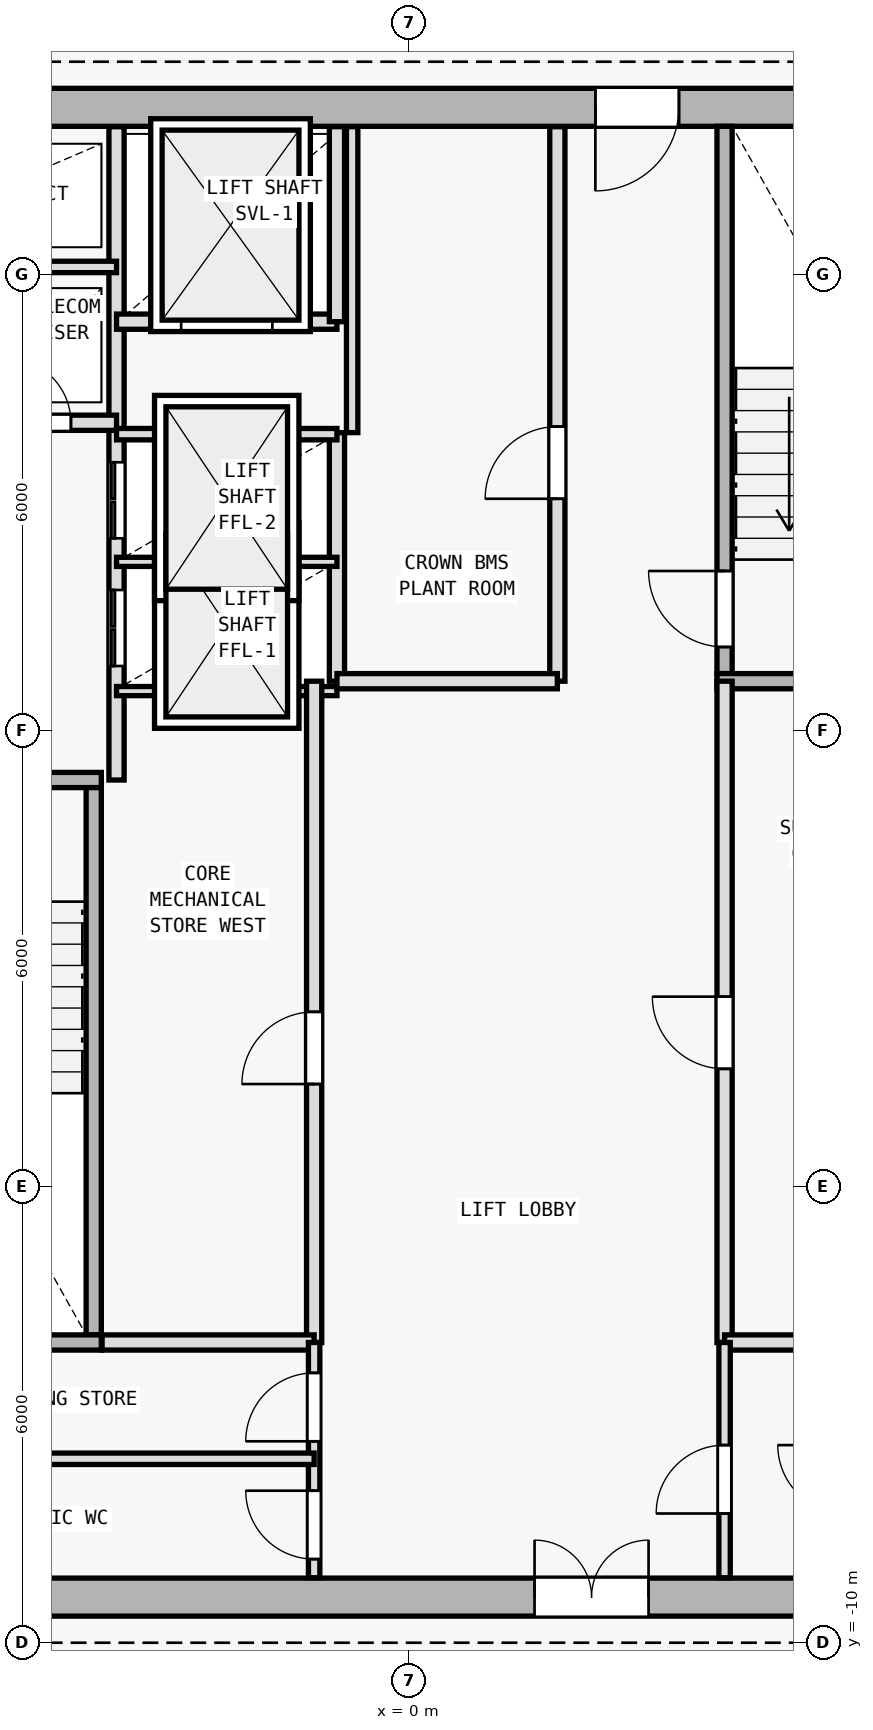
"""IFC4 building model, lengths in metres.
Left out: names, types, materials, properties, quantities, classifications, styles, units other than length and angle.
Written with IfcOpenShell. Run it as: python <this file> out.ifc"""

import sys

from ifc_helpers import new_model, si_unit, direction, frame, frame_2d, origin, origin_2d, place, context, subcontext, project, spatial, rectangle, i_section, extrude, element, fill, save


model = new_model("IFC4")
c1 = context("Model", 3, precision=1e-05, world=origin(), true_north=direction((0.0, 1.0)))
c2 = subcontext(c1, "Body", "Model", "MODEL_VIEW")
j1 = project(units=[si_unit("LENGTHUNIT", "METRE"), si_unit("PLANEANGLEUNIT", "RADIAN")], contexts=[c1])
p1 = place(None, origin())
s1 = spatial("IfcSite", under=j1, at=p1, CompositionType="ELEMENT")
p2 = place(p1, origin())
s2 = spatial("IfcBuilding", under=s1, at=p2, CompositionType="ELEMENT")
p3 = place(p2, frame((0.0, 0.0, 304.8)))
s3 = spatial("IfcBuildingStorey", under=s2, at=p3, CompositionType="ELEMENT", Elevation=304.8)
p4 = place(p3, frame((0.0, -9.4, 0.0), z_axis=(0.0, 0.0, 1.0), x_axis=(1.0, 0.0, 0.0)))
e1 = element("IfcColumn", 1, at=p4, inside=s3, PredefinedType="COLUMN", context=c2, shape_type="SweptSolid", body=[
    extrude(i_section(OverallWidth=0.374, OverallDepth=0.372, WebThickness=0.012, FlangeThickness=0.02, FilletRadius=0.015, at=origin_2d()), origin(), (0.0, 0.0, 1.0), 3.6),
])
p5 = place(p3, frame((-7.95, -9.4, 0.0), z_axis=(0.0, 0.0, 1.0), x_axis=(1.0, 0.0, 0.0)))
e2 = element("IfcWall", 2, at=p5, inside=s3, PredefinedType="SHEAR", context=c2, shape_type="SweptSolid", body=[
    extrude(rectangle(XDim=15.9, YDim=0.5, at=frame_2d((7.95, 0.0))), origin(), (0.0, 0.0, 1.0), 3.34),
])
p6 = place(p5, frame((9.6, 0.0, 0.0)))
e3 = element("IfcOpeningElement", 3, at=p6, cuts=e2, PredefinedType="OPENING", context=c2, shape_type="SweptSolid", body=[
    extrude(rectangle(XDim=1.5, YDim=2.2, at=frame_2d((0.75, 1.1))), frame((0.0, 0.26, 0.0), z_axis=(0.0, -1.0, 0.0), x_axis=(1.0, 0.0, 0.0)), (0.0, 0.0, 1.0), 0.52),
])
p7 = place(p3, frame((7.95, 10.2, 0.0), z_axis=(0.0, 0.0, 1.0), x_axis=(-1.0, 0.0, 0.0)))
e4 = element("IfcWall", 4, at=p7, inside=s3, PredefinedType="SHEAR", context=c2, shape_type="SweptSolid", body=[
    extrude(rectangle(XDim=15.9, YDim=0.5, at=frame_2d((7.95, 0.0))), origin(), (0.0, 0.0, 1.0), 3.34),
])
p8 = place(p7, frame((4.4, 0.0, 0.0)))
e5 = element("IfcOpeningElement", 5, at=p8, cuts=e4, PredefinedType="OPENING", context=c2, shape_type="SweptSolid", body=[
    extrude(rectangle(XDim=1.1, YDim=2.15, at=frame_2d((0.55, 1.075))), frame((0.0, 0.26, 0.0), z_axis=(0.0, -1.0, 0.0), x_axis=(1.0, 0.0, 0.0)), (0.0, 0.0, 1.0), 0.52),
])
p9 = place(p3, frame((-7.45, 1.35, 0.0), z_axis=(0.0, 0.0, 1.0), x_axis=(1.0, 0.0, 0.0)))
e6 = element("IfcWall", 6, at=p9, inside=s3, PredefinedType="SOLIDWALL", context=c2, shape_type="SweptSolid", body=[
    extrude(rectangle(XDim=3.4, YDim=0.2, at=frame_2d((1.7, 0.0))), origin(), (0.0, 0.0, 1.0), 3.34),
])
p10 = place(p9, frame((0.65, 0.0, 0.0)))
e7 = element("IfcOpeningElement", 7, at=p10, cuts=e6, PredefinedType="OPENING", context=c2, shape_type="SweptSolid", body=[
    extrude(rectangle(XDim=1.0, YDim=2.15, at=frame_2d((0.5, 1.075))), frame((0.0, 0.11, 0.0), z_axis=(0.0, -1.0, 0.0), x_axis=(1.0, 0.0, 0.0)), (0.0, 0.0, 1.0), 0.22),
])
p11 = place(p3, frame((-4.15, -5.95, 0.0), z_axis=(0.0, 0.0, 1.0), x_axis=(0.0, 1.0, 0.0)))
e8 = element("IfcWall", 8, at=p11, inside=s3, PredefinedType="SOLIDWALL", context=c2, shape_type="SweptSolid", body=[
    extrude(rectangle(XDim=7.2, YDim=0.2, at=frame_2d((3.6, 0.0))), origin(), (0.0, 0.0, 1.0), 3.34),
])
p12 = place(p3, frame((-3.85, 1.35, 0.0), z_axis=(0.0, 0.0, 1.0), x_axis=(0.0, 1.0, 0.0)))
e9 = element("IfcWall", 9, at=p12, inside=s3, PredefinedType="SOLIDWALL", context=c2, shape_type="SweptSolid", body=[
    extrude(rectangle(XDim=8.595, YDim=0.2, at=frame_2d((4.297, 0.0))), origin(), (0.0, 0.0, 1.0), 3.34),
])
p13 = place(p12, frame((1.5, 0.0, 0.0)))
e10 = element("IfcOpeningElement", 10, at=p13, cuts=e9, PredefinedType="OPENING", context=c2, shape_type="SweptSolid", body=[
    extrude(rectangle(XDim=1.0, YDim=2.15, at=frame_2d((0.5, 1.075))), frame((0.0, 0.11, 0.0), z_axis=(0.0, -1.0, 0.0), x_axis=(1.0, 0.0, 0.0)), (0.0, 0.0, 1.0), 0.22),
])
p14 = place(p12, frame((3.18, 0.0, 0.0)))
e11 = element("IfcOpeningElement", 11, at=p14, cuts=e9, PredefinedType="OPENING", context=c2, shape_type="SweptSolid", body=[
    extrude(rectangle(XDim=1.0, YDim=2.15, at=frame_2d((0.5, 1.075))), frame((0.0, 0.11, 0.0), z_axis=(0.0, -1.0, 0.0), x_axis=(1.0, 0.0, 0.0)), (0.0, 0.0, 1.0), 0.22),
])
p15 = place(p3, frame((-7.445, 6.05, 0.0), z_axis=(0.0, 0.0, 1.0), x_axis=(1.0, 0.0, 0.0)))
e12 = element("IfcWall", 12, at=p15, inside=s3, PredefinedType="SOLIDWALL", context=c2, shape_type="SweptSolid", body=[
    extrude(rectangle(XDim=3.595, YDim=0.2, at=frame_2d((1.797, 0.0))), origin(), (0.0, 0.0, 1.0), 3.34),
])
p16 = place(p15, frame((0.345, 0.0, 0.0)))
e13 = element("IfcOpeningElement", 13, at=p16, cuts=e12, PredefinedType="OPENING", context=c2, shape_type="SweptSolid", body=[
    extrude(rectangle(XDim=0.85, YDim=2.1, at=frame_2d((0.425, 1.05))), frame((0.0, 0.11, 0.0), z_axis=(0.0, -1.0, 0.0), x_axis=(1.0, 0.0, 0.0)), (0.0, 0.0, 1.0), 0.22),
])
p17 = place(p15, frame((2.145, 0.0, 0.0)))
e14 = element("IfcOpeningElement", 14, at=p17, cuts=e12, PredefinedType="OPENING", context=c2, shape_type="SweptSolid", body=[
    extrude(rectangle(XDim=0.85, YDim=2.1, at=frame_2d((0.425, 1.05))), frame((0.0, 0.11, 0.0), z_axis=(0.0, -1.0, 0.0), x_axis=(1.0, 0.0, 0.0)), (0.0, 0.0, 1.0), 0.22),
])
p18 = place(p3, frame((-7.445, 8.1, 0.0), z_axis=(0.0, 0.0, 1.0), x_axis=(1.0, 0.0, 0.0)))
e15 = element("IfcWall", 15, at=p18, inside=s3, PredefinedType="PARTITIONING", context=c2, shape_type="SweptSolid", body=[
    extrude(rectangle(XDim=3.595, YDim=0.15, at=frame_2d((1.797, 0.0))), origin(), (0.0, 0.0, 1.0), 3.34),
])
p19 = place(p3, frame((4.15, 2.75, 0.0), z_axis=(0.0, 0.0, 1.0), x_axis=(0.0, 1.0, 0.0)))
e16 = element("IfcWall", 16, at=p19, inside=s3, PredefinedType="SOLIDWALL", context=c2, shape_type="SweptSolid", body=[
    extrude(rectangle(XDim=7.2, YDim=0.2, at=frame_2d((3.6, 0.0))), origin(), (0.0, 0.0, 1.0), 3.34),
])
p20 = place(p19, frame((0.35, 0.0, 0.0)))
e17 = element("IfcOpeningElement", 17, at=p20, cuts=e16, PredefinedType="OPENING", context=c2, shape_type="SweptSolid", body=[
    extrude(rectangle(XDim=1.0, YDim=2.15, at=frame_2d((0.5, 1.075))), frame((0.0, 0.11, 0.0), z_axis=(0.0, -1.0, 0.0), x_axis=(1.0, 0.0, 0.0)), (0.0, 0.0, 1.0), 0.22),
])
p21 = place(p3, frame((4.05, 2.65, 0.0), z_axis=(0.0, 0.0, 1.0), x_axis=(1.0, 0.0, 0.0)))
e18 = element("IfcWall", 18, at=p21, inside=s3, PredefinedType="SOLIDWALL", context=c2, shape_type="SweptSolid", body=[
    extrude(rectangle(XDim=3.4, YDim=0.2, at=frame_2d((1.7, 0.0))), origin(), (0.0, 0.0, 1.0), 3.34),
])
p22 = place(p3, frame((-0.95, 2.65, 0.0), z_axis=(0.0, 0.0, 1.0), x_axis=(0.0, 1.0, 0.0)))
e19 = element("IfcWall", 19, at=p22, inside=s3, PredefinedType="SOLIDWALL", context=c2, shape_type="SweptSolid", body=[
    extrude(rectangle(XDim=3.27, YDim=0.2, at=frame_2d((1.635, 0.0))), origin(), (0.0, 0.0, 1.0), 3.34),
])
for number, where, z_axis, x_axis in (
    (20, (-3.85, 2.52, 0.0), (0.0, 0.0, 1.0), (1.0, 0.0, 0.0)),
    (21, (-3.85, 4.22, 0.0), (0.0, 0.0, 1.0), (1.0, 0.0, 0.0)),
):
    element("IfcWall", number, at=place(p3, frame(where, z_axis=z_axis, x_axis=x_axis)), inside=s3, PredefinedType="PARTITIONING", context=c2, shape_type="SweptSolid", body=[
        extrude(rectangle(XDim=2.9, YDim=0.12, at=frame_2d((1.45, 0.0))), origin(), (0.0, 0.0, 1.0), 3.34),
    ])
p23 = place(p3, frame((-3.85, 5.9, 0.0), z_axis=(0.0, 0.0, 1.0), x_axis=(1.0, 0.0, 0.0)))
e22 = element("IfcWall", 22, at=p23, inside=s3, PredefinedType="PARTITIONING", context=c2, shape_type="SweptSolid", body=[
    extrude(rectangle(XDim=2.9, YDim=0.15, at=frame_2d((1.45, 0.0))), origin(), (0.0, 0.0, 1.0), 3.34),
])
p24 = place(p3, frame((-3.85, 7.38, 0.0), z_axis=(0.0, 0.0, 1.0), x_axis=(1.0, 0.0, 0.0)))
e23 = element("IfcWall", 23, at=p24, inside=s3, PredefinedType="SOLIDWALL", context=c2, shape_type="SweptSolid", body=[
    extrude(rectangle(XDim=2.9, YDim=0.2, at=frame_2d((1.45, 0.0))), origin(), (0.0, 0.0, 1.0), 3.34),
])
p25 = place(p24, frame((0.85, 0.0, 0.0)))
e24 = element("IfcOpeningElement", 24, at=p25, cuts=e23, PredefinedType="OPENING", context=c2, shape_type="SweptSolid", body=[
    extrude(rectangle(XDim=1.2, YDim=2.2, at=frame_2d((0.6, 1.1))), frame((0.0, 0.11, 0.0), z_axis=(0.0, -1.0, 0.0), x_axis=(1.0, 0.0, 0.0)), (0.0, 0.0, 1.0), 0.22),
])
p26 = place(p3, frame((-0.95, 7.38, 0.0), z_axis=(0.0, 0.0, 1.0), x_axis=(0.0, 1.0, 0.0)))
e25 = element("IfcWall", 25, at=p26, inside=s3, PredefinedType="SOLIDWALL", context=c2, shape_type="SweptSolid", body=[
    extrude(rectangle(XDim=2.565, YDim=0.2, at=frame_2d((1.283, 0.0))), origin(), (0.0, 0.0, 1.0), 3.34),
])
p27 = place(p3, frame((4.15, -6.05, 0.0), z_axis=(0.0, 0.0, 1.0), x_axis=(0.0, 1.0, 0.0)))
e26 = element("IfcWall", 26, at=p27, inside=s3, PredefinedType="SOLIDWALL", context=c2, shape_type="SweptSolid", body=[
    extrude(rectangle(XDim=8.7, YDim=0.2, at=frame_2d((4.35, 0.0))), origin(), (0.0, 0.0, 1.0), 3.34),
])
p28 = place(p27, frame((3.6, 0.0, 0.0)))
e27 = element("IfcOpeningElement", 27, at=p28, cuts=e26, PredefinedType="OPENING", context=c2, shape_type="SweptSolid", body=[
    extrude(rectangle(XDim=0.95, YDim=2.1, at=frame_2d((0.475, 1.05))), frame((0.0, 0.11, 0.0), z_axis=(0.0, -1.0, 0.0), x_axis=(1.0, 0.0, 0.0)), (0.0, 0.0, 1.0), 0.22),
])
p29 = place(p3, frame((-1.25, -6.05, 0.0), z_axis=(0.0, 0.0, 1.0), x_axis=(0.0, 1.0, 0.0)))
e28 = element("IfcWall", 28, at=p29, inside=s3, PredefinedType="SOLIDWALL", context=c2, shape_type="SweptSolid", body=[
    extrude(rectangle(XDim=8.7, YDim=0.2, at=frame_2d((4.35, 0.0))), origin(), (0.0, 0.0, 1.0), 3.34),
])
p30 = place(p29, frame((3.4, 0.0, 0.0)))
e29 = element("IfcOpeningElement", 29, at=p30, cuts=e28, PredefinedType="OPENING", context=c2, shape_type="SweptSolid", body=[
    extrude(rectangle(XDim=0.95, YDim=2.1, at=frame_2d((0.475, 1.05))), frame((0.0, 0.11, 0.0), z_axis=(0.0, -1.0, 0.0), x_axis=(1.0, 0.0, 0.0)), (0.0, 0.0, 1.0), 0.22),
])
p31 = place(p3, frame((1.95, 2.65, 0.0), z_axis=(0.0, 0.0, 1.0), x_axis=(0.0, 1.0, 0.0)))
e30 = element("IfcWall", 30, at=p31, inside=s3, PredefinedType="SOLIDWALL", context=c2, shape_type="SweptSolid", body=[
    extrude(rectangle(XDim=7.295, YDim=0.2, at=frame_2d((3.647, 0.0))), origin(), (0.0, 0.0, 1.0), 3.34),
])
p32 = place(p31, frame((2.4, 0.0, 0.0)))
e31 = element("IfcOpeningElement", 31, at=p32, cuts=e30, PredefinedType="OPENING", context=c2, shape_type="SweptSolid", body=[
    extrude(rectangle(XDim=0.95, YDim=2.1, at=frame_2d((0.475, 1.05))), frame((0.0, 0.11, 0.0), z_axis=(0.0, -1.0, 0.0), x_axis=(1.0, 0.0, 0.0)), (0.0, 0.0, 1.0), 0.22),
])
p33 = place(p3, frame((-0.95, 2.65, 0.0), z_axis=(0.0, 0.0, 1.0), x_axis=(1.0, 0.0, 0.0)))
e32 = element("IfcWall", 32, at=p33, inside=s3, PredefinedType="SOLIDWALL", context=c2, shape_type="SweptSolid", body=[
    extrude(rectangle(XDim=2.9, YDim=0.2, at=frame_2d((1.45, 0.0))), origin(), (0.0, 0.0, 1.0), 3.34),
])
p34 = place(p3, frame((-0.75, 5.92, 0.0), z_axis=(0.0, 0.0, 1.0), x_axis=(0.0, 1.0, 0.0)))
e33 = element("IfcWall", 33, at=p34, inside=s3, PredefinedType="PARTITIONING", context=c2, shape_type="SweptSolid", body=[
    extrude(rectangle(XDim=4.025, YDim=0.15, at=frame_2d((2.013, 0.0))), origin(), (0.0, 0.0, 1.0), 3.34),
])
p35 = place(p3, frame((-7.45, -6.05, 0.0), z_axis=(0.0, 0.0, 1.0), x_axis=(1.0, 0.0, 0.0)))
e34 = element("IfcWall", 34, at=p35, inside=s3, PredefinedType="SOLIDWALL", context=c2, shape_type="SweptSolid", body=[
    extrude(rectangle(XDim=3.4, YDim=0.2, at=frame_2d((1.7, 0.0))), origin(), (0.0, 0.0, 1.0), 3.34),
])
p36 = place(p3, frame((-4.04, -6.05, 0.0), z_axis=(0.0, 0.0, 1.0), x_axis=(1.0, 0.0, 0.0)))
e35 = element("IfcWall", 35, at=p36, inside=s3, PredefinedType="SOLIDWALL", context=c2, shape_type="SweptSolid", body=[
    extrude(rectangle(XDim=2.79, YDim=0.2, at=frame_2d((1.395, 0.0))), origin(), (0.0, 0.0, 1.0), 3.34),
])
p37 = place(p3, frame((4.15, -6.05, 0.0), z_axis=(0.0, 0.0, 1.0), x_axis=(1.0, 0.0, 0.0)))
e36 = element("IfcWall", 36, at=p37, inside=s3, PredefinedType="SOLIDWALL", context=c2, shape_type="SweptSolid", body=[
    extrude(rectangle(XDim=3.295, YDim=0.2, at=frame_2d((1.647, 0.0))), origin(), (0.0, 0.0, 1.0), 3.34),
])
p38 = place(p3, frame((-1.25, -9.145, 0.0), z_axis=(0.0, 0.0, 1.0), x_axis=(0.0, 1.0, 0.0)))
e37 = element("IfcWall", 37, at=p38, inside=s3, PredefinedType="PARTITIONING", context=c2, shape_type="SweptSolid", body=[
    extrude(rectangle(XDim=3.095, YDim=0.15, at=frame_2d((1.547, 0.0))), origin(), (0.0, 0.0, 1.0), 3.34),
])
p39 = place(p38, frame((1.795, 0.0, 0.0)))
e38 = element("IfcOpeningElement", 38, at=p39, cuts=e37, PredefinedType="OPENING", context=c2, shape_type="SweptSolid", body=[
    extrude(rectangle(XDim=0.9, YDim=2.1, at=frame_2d((0.45, 1.05))), frame((0.0, 0.085, 0.0), z_axis=(0.0, -1.0, 0.0), x_axis=(1.0, 0.0, 0.0)), (0.0, 0.0, 1.0), 0.17),
])
p40 = place(p38, frame((0.245, 0.0, 0.0)))
e39 = element("IfcOpeningElement", 39, at=p40, cuts=e37, PredefinedType="OPENING", context=c2, shape_type="SweptSolid", body=[
    extrude(rectangle(XDim=0.9, YDim=2.1, at=frame_2d((0.45, 1.05))), frame((0.0, 0.085, 0.0), z_axis=(0.0, -1.0, 0.0), x_axis=(1.0, 0.0, 0.0)), (0.0, 0.0, 1.0), 0.17),
])
p41 = place(p3, frame((4.15, -9.145, 0.0), z_axis=(0.0, 0.0, 1.0), x_axis=(0.0, 1.0, 0.0)))
e40 = element("IfcWall", 40, at=p41, inside=s3, PredefinedType="PARTITIONING", context=c2, shape_type="SweptSolid", body=[
    extrude(rectangle(XDim=3.095, YDim=0.15, at=frame_2d((1.547, 0.0))), origin(), (0.0, 0.0, 1.0), 3.34),
])
p42 = place(p41, frame((0.845, 0.0, 0.0)))
e41 = element("IfcOpeningElement", 41, at=p42, cuts=e40, PredefinedType="OPENING", context=c2, shape_type="SweptSolid", body=[
    extrude(rectangle(XDim=0.9, YDim=2.1, at=frame_2d((0.45, 1.05))), frame((0.0, 0.085, 0.0), z_axis=(0.0, -1.0, 0.0), x_axis=(1.0, 0.0, 0.0)), (0.0, 0.0, 1.0), 0.17),
])
p43 = place(p3, frame((-7.445, -7.58, 0.0), z_axis=(0.0, 0.0, 1.0), x_axis=(1.0, 0.0, 0.0)))
e42 = element("IfcWall", 42, at=p43, inside=s3, PredefinedType="PARTITIONING", context=c2, shape_type="SweptSolid", body=[
    extrude(rectangle(XDim=6.195, YDim=0.15, at=frame_2d((3.098, 0.0))), origin(), (0.0, 0.0, 1.0), 3.34),
])
p44 = place(p6, origin())
e43 = element("IfcDoor", 43, at=p44, inside=s3, OperationType="DOUBLE_DOOR_SINGLE_SWING", PredefinedType="DOOR", context=c2, shape_type="SweptSolid", body=[
    extrude(rectangle(XDim=1.5, YDim=2.2, at=frame_2d((0.75, 1.1))), frame((0.0, 0.025, 0.0), z_axis=(0.0, -1.0, 0.0), x_axis=(1.0, 0.0, 0.0)), (0.0, 0.0, 1.0), 0.05),
])
fill(e3, e43)
p45 = place(p8, origin())
e44 = element("IfcDoor", 44, at=p45, inside=s3, OperationType="SINGLE_SWING_RIGHT", PredefinedType="DOOR", context=c2, shape_type="SweptSolid", body=[
    extrude(rectangle(XDim=1.1, YDim=2.15, at=frame_2d((0.55, 1.075))), frame((0.0, 0.025, 0.0), z_axis=(0.0, -1.0, 0.0), x_axis=(1.0, 0.0, 0.0)), (0.0, 0.0, 1.0), 0.05),
])
fill(e5, e44)
p46 = place(p17, origin())
e45 = element("IfcDoor", 45, at=p46, inside=s3, OperationType="SINGLE_SWING_LEFT", PredefinedType="DOOR", context=c2, shape_type="SweptSolid", body=[
    extrude(rectangle(XDim=0.85, YDim=2.1, at=frame_2d((0.425, 1.05))), frame((0.0, 0.025, 0.0), z_axis=(0.0, -1.0, 0.0), x_axis=(1.0, 0.0, 0.0)), (0.0, 0.0, 1.0), 0.05),
])
fill(e14, e45)
p47 = place(p20, origin())
e46 = element("IfcDoor", 46, at=p47, inside=s3, OperationType="SINGLE_SWING_RIGHT", PredefinedType="DOOR", context=c2, shape_type="SweptSolid", body=[
    extrude(rectangle(XDim=1.0, YDim=2.15, at=frame_2d((0.5, 1.075))), frame((0.0, 0.025, 0.0), z_axis=(0.0, -1.0, 0.0), x_axis=(1.0, 0.0, 0.0)), (0.0, 0.0, 1.0), 0.05),
])
fill(e17, e46)
p48 = place(p25, origin())
e47 = element("IfcDoor", 47, at=p48, inside=s3, OperationType="DOUBLE_DOOR_SLIDING", PredefinedType="DOOR", context=c2, shape_type="SweptSolid", body=[
    extrude(rectangle(XDim=1.2, YDim=2.2, at=frame_2d((0.6, 1.1))), frame((0.0, 0.025, 0.0), z_axis=(0.0, -1.0, 0.0), x_axis=(1.0, 0.0, 0.0)), (0.0, 0.0, 1.0), 0.05),
])
fill(e24, e47)
p49 = place(p28, origin())
e48 = element("IfcDoor", 48, at=p49, inside=s3, OperationType="SINGLE_SWING_RIGHT", PredefinedType="DOOR", context=c2, shape_type="SweptSolid", body=[
    extrude(rectangle(XDim=0.95, YDim=2.1, at=frame_2d((0.475, 1.05))), frame((0.0, 0.025, 0.0), z_axis=(0.0, -1.0, 0.0), x_axis=(1.0, 0.0, 0.0)), (0.0, 0.0, 1.0), 0.05),
])
fill(e27, e48)
p50 = place(p30, origin())
e49 = element("IfcDoor", 49, at=p50, inside=s3, OperationType="SINGLE_SWING_LEFT", PredefinedType="DOOR", context=c2, shape_type="SweptSolid", body=[
    extrude(rectangle(XDim=0.95, YDim=2.1, at=frame_2d((0.475, 1.05))), frame((0.0, 0.025, 0.0), z_axis=(0.0, -1.0, 0.0), x_axis=(1.0, 0.0, 0.0)), (0.0, 0.0, 1.0), 0.05),
])
fill(e29, e49)
p51 = place(p32, origin())
e50 = element("IfcDoor", 50, at=p51, inside=s3, OperationType="SINGLE_SWING_LEFT", PredefinedType="DOOR", context=c2, shape_type="SweptSolid", body=[
    extrude(rectangle(XDim=0.95, YDim=2.1, at=frame_2d((0.475, 1.05))), frame((0.0, 0.025, 0.0), z_axis=(0.0, -1.0, 0.0), x_axis=(1.0, 0.0, 0.0)), (0.0, 0.0, 1.0), 0.05),
])
fill(e31, e50)
p52 = place(p13, origin())
e51 = element("IfcDoor", 51, at=p52, inside=s3, OperationType="DOUBLE_DOOR_SLIDING", PredefinedType="DOOR", context=c2, shape_type="SweptSolid", body=[
    extrude(rectangle(XDim=1.0, YDim=2.15, at=frame_2d((0.5, 1.075))), frame((0.0, 0.025, 0.0), z_axis=(0.0, -1.0, 0.0), x_axis=(1.0, 0.0, 0.0)), (0.0, 0.0, 1.0), 0.05),
])
fill(e10, e51)
p53 = place(p14, origin())
e52 = element("IfcDoor", 52, at=p53, inside=s3, OperationType="DOUBLE_DOOR_SLIDING", PredefinedType="DOOR", context=c2, shape_type="SweptSolid", body=[
    extrude(rectangle(XDim=1.0, YDim=2.15, at=frame_2d((0.5, 1.075))), frame((0.0, 0.025, 0.0), z_axis=(0.0, -1.0, 0.0), x_axis=(1.0, 0.0, 0.0)), (0.0, 0.0, 1.0), 0.05),
])
fill(e11, e52)
p54 = place(p39, origin())
e53 = element("IfcDoor", 53, at=p54, inside=s3, OperationType="SINGLE_SWING_LEFT", PredefinedType="DOOR", context=c2, shape_type="SweptSolid", body=[
    extrude(rectangle(XDim=0.9, YDim=2.1, at=frame_2d((0.45, 1.05))), frame((0.0, 0.025, 0.0), z_axis=(0.0, -1.0, 0.0), x_axis=(1.0, 0.0, 0.0)), (0.0, 0.0, 1.0), 0.05),
])
fill(e38, e53)
p55 = place(p40, origin())
e54 = element("IfcDoor", 54, at=p55, inside=s3, OperationType="SINGLE_SWING_RIGHT", PredefinedType="DOOR", context=c2, shape_type="SweptSolid", body=[
    extrude(rectangle(XDim=0.9, YDim=2.1, at=frame_2d((0.45, 1.05))), frame((0.0, 0.025, 0.0), z_axis=(0.0, -1.0, 0.0), x_axis=(1.0, 0.0, 0.0)), (0.0, 0.0, 1.0), 0.05),
])
fill(e39, e54)
p56 = place(p42, origin())
e55 = element("IfcDoor", 55, at=p56, inside=s3, OperationType="SINGLE_SWING_LEFT", PredefinedType="DOOR", context=c2, shape_type="SweptSolid", body=[
    extrude(rectangle(XDim=0.9, YDim=2.1, at=frame_2d((0.45, 1.05))), frame((0.0, 0.025, 0.0), z_axis=(0.0, -1.0, 0.0), x_axis=(1.0, 0.0, 0.0)), (0.0, 0.0, 1.0), 0.05),
])
fill(e41, e55)
save(model, sys.argv[1])
